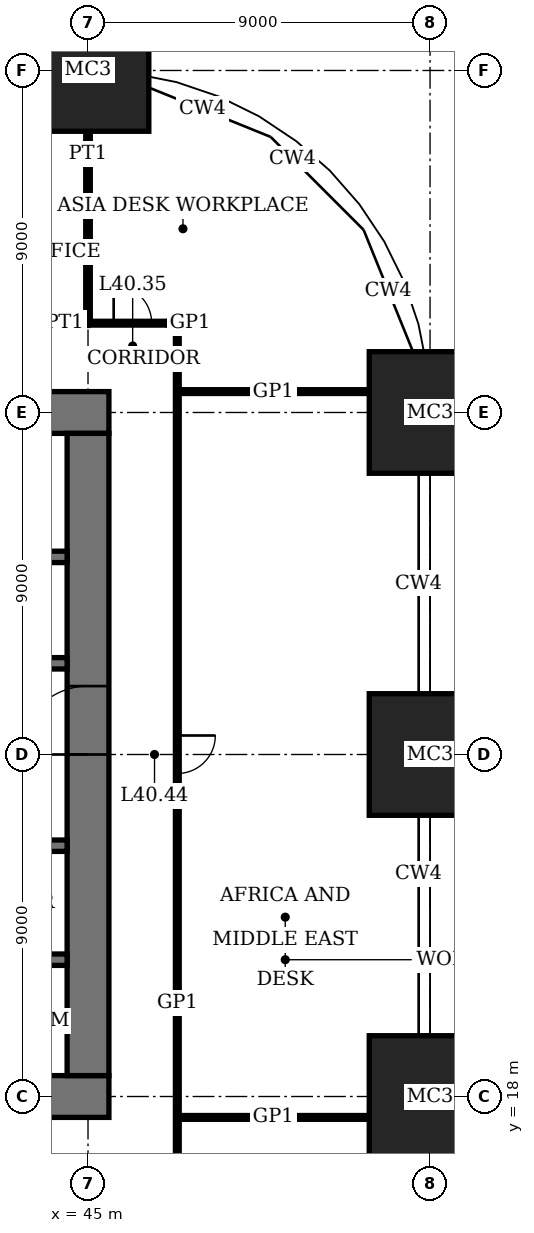
"""IFC4 building model, lengths in metres.
Left out: names, types, materials, properties, quantities, classifications, styles, units other than length and angle.
Written with IfcOpenShell. Run it as: python <this file> out.ifc"""

import sys

from ifc_helpers import new_model, si_unit, direction, frame, frame_2d, origin, origin_2d, place, context, subcontext, project, spatial, rectangle, extrude, element, fill, save


model = new_model("IFC4")
c1 = context("Model", 3, precision=1e-05, world=origin(), true_north=direction((0.0, 1.0)))
c2 = subcontext(c1, "Body", "Model", "MODEL_VIEW")
j1 = project(units=[si_unit("LENGTHUNIT", "METRE"), si_unit("PLANEANGLEUNIT", "RADIAN")], contexts=[c1])
p1 = place(None, origin())
s1 = spatial("IfcSite", under=j1, at=p1, CompositionType="ELEMENT")
p2 = place(p1, origin())
s2 = spatial("IfcBuilding", under=s1, at=p2, CompositionType="ELEMENT")
p3 = place(p2, frame((0.0, 0.0, 166.2)))
s3 = spatial("IfcBuildingStorey", under=s2, at=p3, CompositionType="ELEMENT", Elevation=166.2)
for number, where, z_axis, x_axis in (
    (1, (45.0, 45.0, 0.0), (0.0, 0.0, 1.0), (1.0, 0.0, 0.0)),
    (2, (54.0, 18.0, 0.0), (0.0, 0.0, 1.0), (1.0, 0.0, 0.0)),
    (3, (54.0, 27.0, 0.0), (0.0, 0.0, 1.0), (1.0, 0.0, 0.0)),
    (4, (54.0, 36.0, 0.0), (0.0, 0.0, 1.0), (1.0, 0.0, 0.0)),
):
    element("IfcColumn", number, at=place(p3, frame(where, z_axis=z_axis, x_axis=x_axis)), inside=s3, PredefinedType="COLUMN", context=c2, shape_type="SweptSolid", body=[
        extrude(rectangle(XDim=3.2, YDim=3.2, at=origin_2d()), origin(), (0.0, 0.0, 1.0), 4.0),
    ])
p4 = place(p3, frame((17.45, 18.0, 0.0), z_axis=(0.0, 0.0, 1.0), x_axis=(1.0, 0.0, 0.0)))
e5 = element("IfcWall", 5, at=p4, inside=s3, PredefinedType="SHEAR", context=c2, shape_type="SweptSolid", body=[
    extrude(rectangle(XDim=28.1, YDim=1.1, at=frame_2d((14.05, 0.0))), origin(), (0.0, 0.0, 1.0), 4.0),
])
p5 = place(p4, frame((11.55, 0.0, 0.0)))
e6 = element("IfcOpeningElement", 6, at=p5, cuts=e5, PredefinedType="OPENING", context=c2, shape_type="SweptSolid", body=[
    extrude(rectangle(XDim=1.0, YDim=2.4, at=frame_2d((0.5, 1.2))), frame((0.0, 0.56, 0.0), z_axis=(0.0, -1.0, 0.0), x_axis=(1.0, 0.0, 0.0)), (0.0, 0.0, 1.0), 1.12),
])
p6 = place(p4, frame((16.55, 0.0, 0.0)))
e7 = element("IfcOpeningElement", 7, at=p6, cuts=e5, PredefinedType="OPENING", context=c2, shape_type="SweptSolid", body=[
    extrude(rectangle(XDim=1.0, YDim=2.4, at=frame_2d((0.5, 1.2))), frame((0.0, 0.56, 0.0), z_axis=(0.0, -1.0, 0.0), x_axis=(1.0, 0.0, 0.0)), (0.0, 0.0, 1.0), 1.12),
])
p7 = place(p4, frame((20.0, 0.0, 0.0)))
e8 = element("IfcOpeningElement", 8, at=p7, cuts=e5, PredefinedType="OPENING", context=c2, shape_type="SweptSolid", body=[
    extrude(rectangle(XDim=1.1, YDim=2.4, at=frame_2d((0.55, 1.2))), frame((0.0, 0.56, 0.0), z_axis=(0.0, -1.0, 0.0), x_axis=(1.0, 0.0, 0.0)), (0.0, 0.0, 1.0), 1.12),
])
p8 = place(p4, frame((24.05, 0.0, 0.0)))
e9 = element("IfcOpeningElement", 9, at=p8, cuts=e5, PredefinedType="OPENING", context=c2, shape_type="SweptSolid", body=[
    extrude(rectangle(XDim=1.0, YDim=2.4, at=frame_2d((0.5, 1.2))), frame((0.0, 0.56, 0.0), z_axis=(0.0, -1.0, 0.0), x_axis=(1.0, 0.0, 0.0)), (0.0, 0.0, 1.0), 1.12),
])
p9 = place(p3, frame((45.55, 36.0, 0.0), z_axis=(0.0, 0.0, 1.0), x_axis=(-1.0, 0.0, 0.0)))
e10 = element("IfcWall", 10, at=p9, inside=s3, PredefinedType="SHEAR", context=c2, shape_type="SweptSolid", body=[
    extrude(rectangle(XDim=28.1, YDim=1.1, at=frame_2d((14.05, 0.0))), origin(), (0.0, 0.0, 1.0), 4.0),
])
p10 = place(p9, frame((11.55, 0.0, 0.0)))
e11 = element("IfcOpeningElement", 11, at=p10, cuts=e10, PredefinedType="OPENING", context=c2, shape_type="SweptSolid", body=[
    extrude(rectangle(XDim=1.0, YDim=2.4, at=frame_2d((0.5, 1.2))), frame((0.0, 0.56, 0.0), z_axis=(0.0, -1.0, 0.0), x_axis=(1.0, 0.0, 0.0)), (0.0, 0.0, 1.0), 1.12),
])
p11 = place(p9, frame((16.55, 0.0, 0.0)))
e12 = element("IfcOpeningElement", 12, at=p11, cuts=e10, PredefinedType="OPENING", context=c2, shape_type="SweptSolid", body=[
    extrude(rectangle(XDim=1.0, YDim=2.4, at=frame_2d((0.5, 1.2))), frame((0.0, 0.56, 0.0), z_axis=(0.0, -1.0, 0.0), x_axis=(1.0, 0.0, 0.0)), (0.0, 0.0, 1.0), 1.12),
])
p12 = place(p9, frame((20.0, 0.0, 0.0)))
e13 = element("IfcOpeningElement", 13, at=p12, cuts=e10, PredefinedType="OPENING", context=c2, shape_type="SweptSolid", body=[
    extrude(rectangle(XDim=1.1, YDim=2.4, at=frame_2d((0.55, 1.2))), frame((0.0, 0.56, 0.0), z_axis=(0.0, -1.0, 0.0), x_axis=(1.0, 0.0, 0.0)), (0.0, 0.0, 1.0), 1.12),
])
p13 = place(p9, frame((24.05, 0.0, 0.0)))
e14 = element("IfcOpeningElement", 14, at=p13, cuts=e10, PredefinedType="OPENING", context=c2, shape_type="SweptSolid", body=[
    extrude(rectangle(XDim=1.0, YDim=2.4, at=frame_2d((0.5, 1.2))), frame((0.0, 0.56, 0.0), z_axis=(0.0, -1.0, 0.0), x_axis=(1.0, 0.0, 0.0)), (0.0, 0.0, 1.0), 1.12),
])
p14 = place(p3, frame((45.0, 18.55, 0.0), z_axis=(0.0, 0.0, 1.0), x_axis=(0.0, 1.0, 0.0)))
e15 = element("IfcWall", 15, at=p14, inside=s3, PredefinedType="SHEAR", context=c2, shape_type="SweptSolid", body=[
    extrude(rectangle(XDim=16.9, YDim=1.1, at=frame_2d((8.45, 0.0))), origin(), (0.0, 0.0, 1.0), 4.0),
])
p15 = place(p14, frame((8.45, 0.0, 0.0)))
e16 = element("IfcOpeningElement", 16, at=p15, cuts=e15, PredefinedType="OPENING", context=c2, shape_type="SweptSolid", body=[
    extrude(rectangle(XDim=1.8, YDim=2.4, at=frame_2d((0.9, 1.2))), frame((0.0, 0.56, 0.0), z_axis=(0.0, -1.0, 0.0), x_axis=(1.0, 0.0, 0.0)), (0.0, 0.0, 1.0), 1.12),
])
p16 = place(p3, frame((36.15, 32.2, 0.0), z_axis=(0.0, 0.0, 1.0), x_axis=(1.0, 0.0, 0.0)))
e17 = element("IfcWall", 17, at=p16, inside=s3, PredefinedType="SHEAR", context=c2, shape_type="SweptSolid", body=[
    extrude(rectangle(XDim=8.3, YDim=0.3, at=frame_2d((4.15, 0.0))), origin(), (0.0, 0.0, 1.0), 4.0),
])
p17 = place(p16, frame((0.45, 0.0, 0.0)))
e18 = element("IfcOpeningElement", 18, at=p17, cuts=e17, PredefinedType="OPENING", context=c2, shape_type="SweptSolid", body=[
    extrude(rectangle(XDim=1.0, YDim=2.4, at=frame_2d((0.5, 1.2))), frame((0.0, 0.16, 0.0), z_axis=(0.0, -1.0, 0.0), x_axis=(1.0, 0.0, 0.0)), (0.0, 0.0, 1.0), 0.32),
])
p18 = place(p3, frame((18.55, 24.6, 0.0), z_axis=(0.0, 0.0, 1.0), x_axis=(1.0, 0.0, 0.0)))
e19 = element("IfcWall", 19, at=p18, inside=s3, PredefinedType="SHEAR", context=c2, shape_type="SweptSolid", body=[
    extrude(rectangle(XDim=25.9, YDim=0.3, at=frame_2d((12.95, 0.0))), origin(), (0.0, 0.0, 1.0), 4.0),
])
p19 = place(p18, frame((4.95, 0.0, 0.0)))
e20 = element("IfcOpeningElement", 20, at=p19, cuts=e19, PredefinedType="OPENING", context=c2, shape_type="SweptSolid", body=[
    extrude(rectangle(XDim=1.0, YDim=2.4, at=frame_2d((0.5, 1.2))), frame((0.0, 0.16, 0.0), z_axis=(0.0, -1.0, 0.0), x_axis=(1.0, 0.0, 0.0)), (0.0, 0.0, 1.0), 0.32),
])
p20 = place(p18, frame((24.5, 0.0, 0.0)))
e21 = element("IfcOpeningElement", 21, at=p20, cuts=e19, PredefinedType="OPENING", context=c2, shape_type="SweptSolid", body=[
    extrude(rectangle(XDim=0.9, YDim=2.1, at=frame_2d((0.45, 1.05))), frame((0.0, 0.16, 0.0), z_axis=(0.0, -1.0, 0.0), x_axis=(1.0, 0.0, 0.0)), (0.0, 0.0, 1.0), 0.32),
])
p21 = place(p18, frame((21.3, 0.0, 0.0)))
e22 = element("IfcOpeningElement", 22, at=p21, cuts=e19, PredefinedType="OPENING", context=c2, shape_type="SweptSolid", body=[
    extrude(rectangle(XDim=1.3, YDim=2.4, at=frame_2d((0.65, 1.2))), frame((0.0, 0.16, 0.0), z_axis=(0.0, -1.0, 0.0), x_axis=(1.0, 0.0, 0.0)), (0.0, 0.0, 1.0), 0.32),
])
p22 = place(p3, frame((18.55, 29.4, 0.0), z_axis=(0.0, 0.0, 1.0), x_axis=(1.0, 0.0, 0.0)))
e23 = element("IfcWall", 23, at=p22, inside=s3, PredefinedType="SHEAR", context=c2, shape_type="SweptSolid", body=[
    extrude(rectangle(XDim=25.9, YDim=0.3, at=frame_2d((12.95, 0.0))), origin(), (0.0, 0.0, 1.0), 4.0),
])
p23 = place(p22, frame((19.95, 0.0, 0.0)))
e24 = element("IfcOpeningElement", 24, at=p23, cuts=e23, PredefinedType="OPENING", context=c2, shape_type="SweptSolid", body=[
    extrude(rectangle(XDim=1.0, YDim=2.4, at=frame_2d((0.5, 1.2))), frame((0.0, 0.16, 0.0), z_axis=(0.0, -1.0, 0.0), x_axis=(1.0, 0.0, 0.0)), (0.0, 0.0, 1.0), 0.32),
])
p24 = place(p22, frame((0.5, 0.0, 0.0)))
e25 = element("IfcOpeningElement", 25, at=p24, cuts=e23, PredefinedType="OPENING", context=c2, shape_type="SweptSolid", body=[
    extrude(rectangle(XDim=0.9, YDim=2.1, at=frame_2d((0.45, 1.05))), frame((0.0, 0.16, 0.0), z_axis=(0.0, -1.0, 0.0), x_axis=(1.0, 0.0, 0.0)), (0.0, 0.0, 1.0), 0.32),
])
p25 = place(p22, frame((15.45, 0.0, 0.0)))
e26 = element("IfcOpeningElement", 26, at=p25, cuts=e23, PredefinedType="OPENING", context=c2, shape_type="SweptSolid", body=[
    extrude(rectangle(XDim=1.0, YDim=2.4, at=frame_2d((0.5, 1.2))), frame((0.0, 0.16, 0.0), z_axis=(0.0, -1.0, 0.0), x_axis=(1.0, 0.0, 0.0)), (0.0, 0.0, 1.0), 0.32),
])
p26 = place(p22, frame((12.45, 0.0, 0.0)))
e27 = element("IfcOpeningElement", 27, at=p26, cuts=e23, PredefinedType="OPENING", context=c2, shape_type="SweptSolid", body=[
    extrude(rectangle(XDim=1.0, YDim=2.4, at=frame_2d((0.5, 1.2))), frame((0.0, 0.16, 0.0), z_axis=(0.0, -1.0, 0.0), x_axis=(1.0, 0.0, 0.0)), (0.0, 0.0, 1.0), 0.32),
])
p27 = place(p22, frame((9.4, 0.0, 0.0)))
e28 = element("IfcOpeningElement", 28, at=p27, cuts=e23, PredefinedType="OPENING", context=c2, shape_type="SweptSolid", body=[
    extrude(rectangle(XDim=1.1, YDim=2.4, at=frame_2d((0.55, 1.2))), frame((0.0, 0.16, 0.0), z_axis=(0.0, -1.0, 0.0), x_axis=(1.0, 0.0, 0.0)), (0.0, 0.0, 1.0), 0.32),
])
p28 = place(p22, frame((6.4, 0.0, 0.0)))
e29 = element("IfcOpeningElement", 29, at=p28, cuts=e23, PredefinedType="OPENING", context=c2, shape_type="SweptSolid", body=[
    extrude(rectangle(XDim=1.1, YDim=2.4, at=frame_2d((0.55, 1.2))), frame((0.0, 0.16, 0.0), z_axis=(0.0, -1.0, 0.0), x_axis=(1.0, 0.0, 0.0)), (0.0, 0.0, 1.0), 0.32),
])
p29 = place(p22, frame((3.3, 0.0, 0.0)))
e30 = element("IfcOpeningElement", 30, at=p29, cuts=e23, PredefinedType="OPENING", context=c2, shape_type="SweptSolid", body=[
    extrude(rectangle(XDim=1.3, YDim=2.4, at=frame_2d((0.65, 1.2))), frame((0.0, 0.16, 0.0), z_axis=(0.0, -1.0, 0.0), x_axis=(1.0, 0.0, 0.0)), (0.0, 0.0, 1.0), 0.32),
])
p30 = place(p3, frame((27.15, 21.6, 0.0), z_axis=(0.0, 0.0, 1.0), x_axis=(1.0, 0.0, 0.0)))
e31 = element("IfcWall", 31, at=p30, inside=s3, PredefinedType="SHEAR", context=c2, shape_type="SweptSolid", body=[
    extrude(rectangle(XDim=17.3, YDim=0.3, at=frame_2d((8.65, 0.0))), origin(), (0.0, 0.0, 1.0), 4.0),
])
for number, where, z_axis, x_axis in (
    (32, (47.35, 17.45, 0.0), (0.0, 0.0, 1.0), (1.0, 0.0, 0.0)),
    (33, (47.35, 36.55, 0.0), (0.0, 0.0, 1.0), (1.0, 0.0, 0.0)),
):
    element("IfcWall", number, at=place(p3, frame(where, z_axis=z_axis, x_axis=x_axis)), inside=s3, PredefinedType="PARTITIONING", context=c2, shape_type="SweptSolid", body=[
        extrude(rectangle(XDim=5.05, YDim=0.1, at=frame_2d((2.525, 0.0))), origin(), (0.0, 0.0, 1.0), 3.05),
    ])
p31 = place(p3, frame((40.5, 38.35, 0.0), z_axis=(0.0, 0.0, 1.0), x_axis=(1.0, 0.0, 0.0)))
e34 = element("IfcWall", 34, at=p31, inside=s3, PredefinedType="PARTITIONING", context=c2, shape_type="SweptSolid", body=[
    extrude(rectangle(XDim=4.5, YDim=0.12, at=frame_2d((2.25, 0.0))), origin(), (0.0, 0.0, 1.0), 3.75),
])
p32 = place(p31, frame((1.75, 0.0, 0.0)))
e35 = element("IfcOpeningElement", 35, at=p32, cuts=e34, PredefinedType="OPENING", context=c2, shape_type="SweptSolid", body=[
    extrude(rectangle(XDim=1.0, YDim=2.4, at=frame_2d((0.5, 1.2))), frame((0.0, 0.07, 0.0), z_axis=(0.0, -1.0, 0.0), x_axis=(1.0, 0.0, 0.0)), (0.0, 0.0, 1.0), 0.14),
])
p33 = place(p3, frame((45.0, 38.35, 0.0), z_axis=(0.0, 0.0, 1.0), x_axis=(1.0, 0.0, 0.0)))
e36 = element("IfcWall", 36, at=p33, inside=s3, PredefinedType="PARTITIONING", context=c2, shape_type="SweptSolid", body=[
    extrude(rectangle(XDim=2.35, YDim=0.1, at=frame_2d((1.175, 0.0))), origin(), (0.0, 0.0, 1.0), 3.75),
])
p34 = place(p33, frame((0.675, 0.0, 0.0)))
e37 = element("IfcOpeningElement", 37, at=p34, cuts=e36, PredefinedType="OPENING", context=c2, shape_type="SweptSolid", body=[
    extrude(rectangle(XDim=1.0, YDim=2.4, at=frame_2d((0.5, 1.2))), frame((0.0, 0.06, 0.0), z_axis=(0.0, -1.0, 0.0), x_axis=(1.0, 0.0, 0.0)), (0.0, 0.0, 1.0), 0.12),
])
p35 = place(p3, frame((45.0, 38.35, 0.0), z_axis=(0.0, 0.0, 1.0), x_axis=(0.0, 1.0, 0.0)))
e38 = element("IfcWall", 38, at=p35, inside=s3, PredefinedType="PARTITIONING", context=c2, shape_type="SweptSolid", body=[
    extrude(rectangle(XDim=5.05, YDim=0.12, at=frame_2d((2.525, 0.0))), origin(), (0.0, 0.0, 1.0), 3.05),
])
p36 = place(p3, frame((47.35, 15.65, 0.0), z_axis=(0.0, 0.0, 1.0), x_axis=(0.0, 1.0, 0.0)))
e39 = element("IfcWall", 39, at=p36, inside=s3, PredefinedType="PARTITIONING", context=c2, shape_type="SweptSolid", body=[
    extrude(rectangle(XDim=22.7, YDim=0.1, at=frame_2d((11.35, 0.0))), origin(), (0.0, 0.0, 1.0), 3.75),
])
p37 = place(p36, frame((10.85, 0.0, 0.0)))
e40 = element("IfcOpeningElement", 40, at=p37, cuts=e39, PredefinedType="OPENING", context=c2, shape_type="SweptSolid", body=[
    extrude(rectangle(XDim=1.0, YDim=2.4, at=frame_2d((0.5, 1.2))), frame((0.0, 0.06, 0.0), z_axis=(0.0, -1.0, 0.0), x_axis=(1.0, 0.0, 0.0)), (0.0, 0.0, 1.0), 0.12),
])
p38 = place(p15, origin())
e41 = element("IfcDoor", 41, at=p38, inside=s3, OperationType="DOUBLE_DOOR_DOUBLE_SWING", PredefinedType="DOOR", context=c2, shape_type="SweptSolid", body=[
    extrude(rectangle(XDim=1.8, YDim=2.4, at=frame_2d((0.9, 1.2))), frame((0.0, 0.03, 0.0), z_axis=(0.0, -1.0, 0.0), x_axis=(1.0, 0.0, 0.0)), (0.0, 0.0, 1.0), 0.06),
    extrude(rectangle(XDim=0.04, YDim=2.4, at=frame_2d((0.02, 1.2))), frame((0.0, 0.55, 0.0), z_axis=(0.0, -1.0, 0.0), x_axis=(1.0, 0.0, 0.0)), (0.0, 0.0, 1.0), 1.1),
    extrude(rectangle(XDim=0.04, YDim=2.4, at=frame_2d((1.78, 1.2))), frame((0.0, 0.55, 0.0), z_axis=(0.0, -1.0, 0.0), x_axis=(1.0, 0.0, 0.0)), (0.0, 0.0, 1.0), 1.1),
    extrude(rectangle(XDim=1.8, YDim=0.04, at=frame_2d((0.9, 2.38))), frame((0.0, 0.55, 0.0), z_axis=(0.0, -1.0, 0.0), x_axis=(1.0, 0.0, 0.0)), (0.0, 0.0, 1.0), 1.1),
])
fill(e16, e41)
p39 = place(p34, origin())
e42 = element("IfcDoor", 42, at=p39, inside=s3, OperationType="SINGLE_SWING_RIGHT", PredefinedType="DOOR", context=c2, shape_type="SweptSolid", body=[
    extrude(rectangle(XDim=1.0, YDim=2.4, at=frame_2d((0.5, 1.2))), frame((0.0, 0.02, 0.0), z_axis=(0.0, -1.0, 0.0), x_axis=(1.0, 0.0, 0.0)), (0.0, 0.0, 1.0), 0.04),
])
fill(e37, e42)
p40 = place(p37, origin())
e43 = element("IfcDoor", 43, at=p40, inside=s3, OperationType="SINGLE_SWING_RIGHT", PredefinedType="DOOR", context=c2, shape_type="SweptSolid", body=[
    extrude(rectangle(XDim=1.0, YDim=2.4, at=frame_2d((0.5, 1.2))), frame((0.0, 0.02, 0.0), z_axis=(0.0, -1.0, 0.0), x_axis=(1.0, 0.0, 0.0)), (0.0, 0.0, 1.0), 0.04),
])
fill(e40, e43)
save(model, sys.argv[1])
